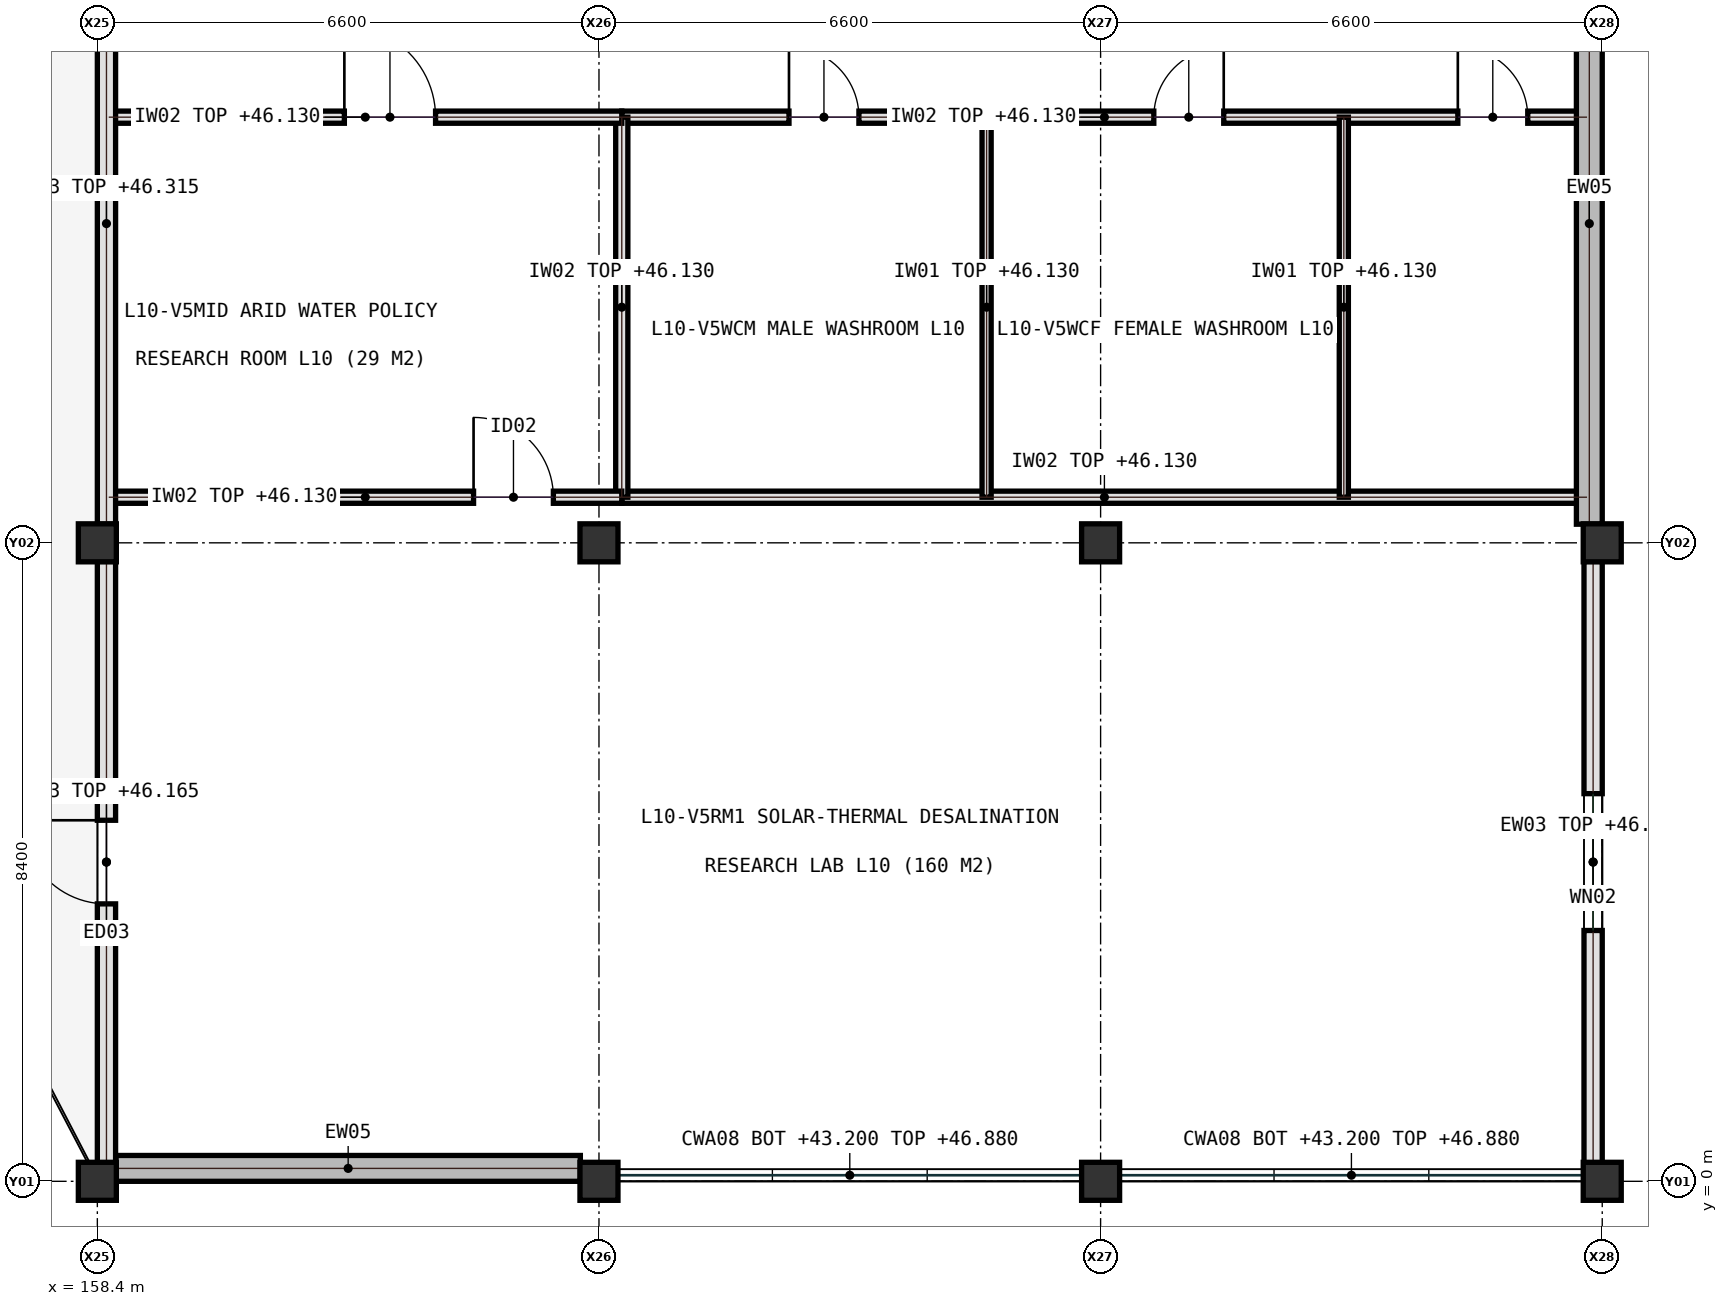
"""IFC4 building model, lengths in metres.
Left out: names, types, materials, properties, quantities, classifications, styles, units other than length and angle.
Written with IfcOpenShell. Run it as: python <this file> out.ifc"""

import sys

from ifc_helpers import new_model, si_unit, direction, frame, frame_2d, origin, origin_2d, place, context, subcontext, project, spatial, rectangle, extrude, element, fill, save


model = new_model("IFC4")
c1 = context("Model", 3, precision=1e-05, world=origin(), true_north=direction((0.0, 1.0)))
c2 = subcontext(c1, "Body", "Model", "MODEL_VIEW")
j1 = project(units=[si_unit("LENGTHUNIT", "METRE"), si_unit("PLANEANGLEUNIT", "RADIAN")], contexts=[c1])
p1 = place(None, origin())
s1 = spatial("IfcSite", under=j1, at=p1, CompositionType="ELEMENT")
p2 = place(p1, origin())
s2 = spatial("IfcBuilding", under=s1, at=p2, CompositionType="ELEMENT")
p3 = place(p2, frame((0.0, 0.0, 43.2)))
s3 = spatial("IfcBuildingStorey", under=s2, at=p3, CompositionType="ELEMENT", Elevation=43.2)
for number, where, z_axis, x_axis in (
    (1, (158.4, 0.0, 0.0), (0.0, 0.0, 1.0), (1.0, 0.0, 0.0)),
    (2, (158.4, 8.4, 0.0), (0.0, 0.0, 1.0), (1.0, 0.0, 0.0)),
    (3, (165.0, 0.0, 0.0), (0.0, 0.0, 1.0), (1.0, 0.0, 0.0)),
    (4, (165.0, 8.4, 0.0), (0.0, 0.0, 1.0), (1.0, 0.0, 0.0)),
    (5, (171.6, 0.0, 0.0), (0.0, 0.0, 1.0), (1.0, 0.0, 0.0)),
    (6, (171.6, 8.4, 0.0), (0.0, 0.0, 1.0), (1.0, 0.0, 0.0)),
    (7, (178.2, 0.0, 0.0), (0.0, 0.0, 1.0), (1.0, 0.0, 0.0)),
    (8, (178.2, 8.4, 0.0), (0.0, 0.0, 1.0), (1.0, 0.0, 0.0)),
):
    element("IfcColumn", number, at=place(p3, frame(where, z_axis=z_axis, x_axis=x_axis)), inside=s3, PredefinedType="COLUMN", context=c2, shape_type="SweptSolid", body=[
        extrude(rectangle(XDim=0.5, YDim=0.5, at=origin_2d()), origin(), (0.0, 0.0, 1.0), 3.9),
    ])
p4 = place(p3, frame((165.3, 14.0, 0.0), z_axis=(0.0, 0.0, 1.0), x_axis=(1.0, 0.0, 0.0)))
e9 = element("IfcWall", 9, at=p4, inside=s3, PredefinedType="PARTITIONING", context=c2, shape_type="SweptSolid", body=[
    extrude(rectangle(XDim=12.7, YDim=0.16, at=frame_2d((6.35, 0.0))), origin(), (0.0, 0.0, 1.0), 2.93),
])
p5 = place(p4, frame((2.2, 0.0, 0.0)))
e10 = element("IfcOpeningElement", 10, at=p5, cuts=e9, PredefinedType="OPENING", context=c2, shape_type="SweptSolid", body=[
    extrude(rectangle(XDim=0.92, YDim=2.08, at=frame_2d((0.46, 1.04))), frame((0.0, 0.09, 0.0), z_axis=(0.0, -1.0, 0.0), x_axis=(1.0, 0.0, 0.0)), (0.0, 0.0, 1.0), 0.18),
])
p6 = place(p4, frame((7.0, 0.0, 0.0)))
e11 = element("IfcOpeningElement", 11, at=p6, cuts=e9, PredefinedType="OPENING", context=c2, shape_type="SweptSolid", body=[
    extrude(rectangle(XDim=0.92, YDim=2.08, at=frame_2d((0.46, 1.04))), frame((0.0, 0.09, 0.0), z_axis=(0.0, -1.0, 0.0), x_axis=(1.0, 0.0, 0.0)), (0.0, 0.0, 1.0), 0.18),
])
p7 = place(p4, frame((11.0, 0.0, 0.0)))
e12 = element("IfcOpeningElement", 12, at=p7, cuts=e9, PredefinedType="OPENING", context=c2, shape_type="SweptSolid", body=[
    extrude(rectangle(XDim=0.92, YDim=2.08, at=frame_2d((0.46, 1.04))), frame((0.0, 0.09, 0.0), z_axis=(0.0, -1.0, 0.0), x_axis=(1.0, 0.0, 0.0)), (0.0, 0.0, 1.0), 0.18),
])
p8 = place(p3, frame((165.3, 9.0, 0.0), z_axis=(0.0, 0.0, 1.0), x_axis=(1.0, 0.0, 0.0)))
e13 = element("IfcWall", 13, at=p8, inside=s3, PredefinedType="PARTITIONING", context=c2, shape_type="SweptSolid", body=[
    extrude(rectangle(XDim=12.7, YDim=0.16, at=frame_2d((6.35, 0.0))), origin(), (0.0, 0.0, 1.0), 2.93),
])
p9 = place(p3, frame((165.3, 9.0, 0.0), z_axis=(0.0, 0.0, 1.0), x_axis=(0.0, 1.0, 0.0)))
e14 = element("IfcWall", 14, at=p9, inside=s3, PredefinedType="PARTITIONING", context=c2, shape_type="SweptSolid", body=[
    extrude(rectangle(XDim=5.0, YDim=0.16, at=frame_2d((2.5, 0.0))), origin(), (0.0, 0.0, 1.0), 2.93),
])
for number, where, z_axis, x_axis in (
    (15, (170.1, 9.0, 0.0), (0.0, 0.0, 1.0), (0.0, 1.0, 0.0)),
    (16, (174.8, 9.0, 0.0), (0.0, 0.0, 1.0), (0.0, 1.0, 0.0)),
):
    element("IfcWall", number, at=place(p3, frame(where, z_axis=z_axis, x_axis=x_axis)), inside=s3, PredefinedType="PARTITIONING", context=c2, shape_type="SweptSolid", body=[
        extrude(rectangle(XDim=5.0, YDim=0.12, at=frame_2d((2.5, 0.0))), origin(), (0.0, 0.0, 1.0), 2.93),
    ])
p10 = place(p3, frame((158.55, 9.0, 0.0), z_axis=(0.0, 0.0, 1.0), x_axis=(1.0, 0.0, 0.0)))
e17 = element("IfcWall", 17, at=p10, inside=s3, PredefinedType="PARTITIONING", context=c2, shape_type="SweptSolid", body=[
    extrude(rectangle(XDim=6.75, YDim=0.16, at=frame_2d((3.375, 0.0))), origin(), (0.0, 0.0, 1.0), 2.93),
])
p11 = place(p10, frame((4.8, 0.0, 0.0)))
e18 = element("IfcOpeningElement", 18, at=p11, cuts=e17, PredefinedType="OPENING", context=c2, shape_type="SweptSolid", body=[
    extrude(rectangle(XDim=1.05, YDim=2.15, at=frame_2d((0.525, 1.075))), frame((0.0, 0.09, 0.0), z_axis=(0.0, -1.0, 0.0), x_axis=(1.0, 0.0, 0.0)), (0.0, 0.0, 1.0), 0.18),
])
p12 = place(p3, frame((158.55, 14.0, 0.0), z_axis=(0.0, 0.0, 1.0), x_axis=(1.0, 0.0, 0.0)))
e19 = element("IfcWall", 19, at=p12, inside=s3, PredefinedType="PARTITIONING", context=c2, shape_type="SweptSolid", body=[
    extrude(rectangle(XDim=6.75, YDim=0.16, at=frame_2d((3.375, 0.0))), origin(), (0.0, 0.0, 1.0), 2.93),
])
p13 = place(p12, frame((3.1, 0.0, 0.0)))
e20 = element("IfcOpeningElement", 20, at=p13, cuts=e19, PredefinedType="OPENING", context=c2, shape_type="SweptSolid", body=[
    extrude(rectangle(XDim=1.2, YDim=2.22, at=frame_2d((0.6, 1.11))), frame((0.0, 0.09, 0.0), z_axis=(0.0, -1.0, 0.0), x_axis=(1.0, 0.0, 0.0)), (0.0, 0.0, 1.0), 0.18),
])
p14 = place(p3, frame((158.645, 0.17, 0.0), z_axis=(0.0, 0.0, 1.0), x_axis=(1.0, 0.0, 0.0)))
e21 = element("IfcWall", 21, at=p14, inside=s3, PredefinedType="SHEAR", context=c2, shape_type="SweptSolid", body=[
    extrude(rectangle(XDim=6.11, YDim=0.34, at=frame_2d((3.055, 0.0))), origin(), (0.0, 0.0, 1.0), 3.68),
])
p15 = place(p3, frame((158.52, 8.155, 0.0), z_axis=(0.0, 0.0, 1.0), x_axis=(0.0, -1.0, 0.0)))
e22 = element("IfcWall", 22, at=p15, inside=s3, PredefinedType="SOLIDWALL", context=c2, shape_type="SweptSolid", body=[
    extrude(rectangle(XDim=7.91, YDim=0.24, at=frame_2d((3.955, 0.0))), origin(), (0.0, 0.0, 1.0), 2.965),
])
p16 = place(p15, frame((3.405, 0.0, 0.0)))
e23 = element("IfcOpeningElement", 23, at=p16, cuts=e22, PredefinedType="OPENING", context=c2, shape_type="SweptSolid", body=[
    extrude(rectangle(XDim=1.1, YDim=2.2, at=frame_2d((0.55, 1.1))), frame((0.0, 0.13, 0.0), z_axis=(0.0, -1.0, 0.0), x_axis=(1.0, 0.0, 0.0)), (0.0, 0.0, 1.0), 0.26),
])
p17 = place(p3, frame((158.52, 16.555, 0.0), z_axis=(0.0, 0.0, 1.0), x_axis=(0.0, -1.0, 0.0)))
e24 = element("IfcWall", 24, at=p17, inside=s3, PredefinedType="SOLIDWALL", context=c2, shape_type="SweptSolid", body=[
    extrude(rectangle(XDim=7.91, YDim=0.24, at=frame_2d((3.955, 0.0))), origin(), (0.0, 0.0, 1.0), 3.115),
])
p18 = place(p3, frame((178.08, 0.245, 0.0), z_axis=(0.0, 0.0, 1.0), x_axis=(0.0, 1.0, 0.0)))
e25 = element("IfcWall", 25, at=p18, inside=s3, PredefinedType="SOLIDWALL", context=c2, shape_type="SweptSolid", body=[
    extrude(rectangle(XDim=7.91, YDim=0.24, at=frame_2d((3.955, 0.0))), origin(), (0.0, 0.0, 1.0), 2.965),
])
p19 = place(p18, frame((3.055, 0.0, 0.95)))
e26 = element("IfcOpeningElement", 26, at=p19, cuts=e25, PredefinedType="OPENING", context=c2, shape_type="SweptSolid", body=[
    extrude(rectangle(XDim=1.8, YDim=1.6, at=frame_2d((0.9, 0.8))), frame((0.0, 0.13, 0.0), z_axis=(0.0, -1.0, 0.0), x_axis=(1.0, 0.0, 0.0)), (0.0, 0.0, 1.0), 0.26),
])
p20 = place(p3, frame((178.03, 8.645, 0.0), z_axis=(0.0, 0.0, 1.0), x_axis=(0.0, 1.0, 0.0)))
e27 = element("IfcWall", 27, at=p20, inside=s3, PredefinedType="SHEAR", context=c2, shape_type="SweptSolid", body=[
    extrude(rectangle(XDim=7.91, YDim=0.34, at=frame_2d((3.955, 0.0))), origin(), (0.0, 0.0, 1.0), 3.68),
])
p21 = place(p5, origin())
e28 = element("IfcDoor", 28, at=p21, inside=s3, OperationType="SINGLE_SWING_LEFT", PredefinedType="DOOR", context=c2, shape_type="SweptSolid", body=[
    extrude(rectangle(XDim=0.92, YDim=2.08, at=frame_2d((0.46, 1.04))), frame((0.0, 0.025, 0.0), z_axis=(0.0, -1.0, 0.0), x_axis=(1.0, 0.0, 0.0)), (0.0, 0.0, 1.0), 0.05),
])
fill(e10, e28)
p22 = place(p6, origin())
e29 = element("IfcDoor", 29, at=p22, inside=s3, OperationType="SINGLE_SWING_RIGHT", PredefinedType="DOOR", context=c2, shape_type="SweptSolid", body=[
    extrude(rectangle(XDim=0.92, YDim=2.08, at=frame_2d((0.46, 1.04))), frame((0.0, 0.025, 0.0), z_axis=(0.0, -1.0, 0.0), x_axis=(1.0, 0.0, 0.0)), (0.0, 0.0, 1.0), 0.05),
])
fill(e11, e29)
p23 = place(p7, origin())
e30 = element("IfcDoor", 30, at=p23, inside=s3, OperationType="SINGLE_SWING_LEFT", PredefinedType="DOOR", context=c2, shape_type="SweptSolid", body=[
    extrude(rectangle(XDim=0.92, YDim=2.08, at=frame_2d((0.46, 1.04))), frame((0.0, 0.025, 0.0), z_axis=(0.0, -1.0, 0.0), x_axis=(1.0, 0.0, 0.0)), (0.0, 0.0, 1.0), 0.05),
])
fill(e12, e30)
p24 = place(p11, origin())
e31 = element("IfcDoor", 31, at=p24, inside=s3, OperationType="SINGLE_SWING_LEFT", PredefinedType="DOOR", context=c2, shape_type="SweptSolid", body=[
    extrude(rectangle(XDim=1.05, YDim=2.15, at=frame_2d((0.525, 1.075))), frame((0.0, 0.025, 0.0), z_axis=(0.0, -1.0, 0.0), x_axis=(1.0, 0.0, 0.0)), (0.0, 0.0, 1.0), 0.05),
])
fill(e18, e31)
p25 = place(p13, origin())
e32 = element("IfcDoor", 32, at=p25, inside=s3, OperationType="SINGLE_SWING_LEFT", PredefinedType="DOOR", context=c2, shape_type="SweptSolid", body=[
    extrude(rectangle(XDim=1.2, YDim=2.22, at=frame_2d((0.6, 1.11))), frame((0.0, 0.025, 0.0), z_axis=(0.0, -1.0, 0.0), x_axis=(1.0, 0.0, 0.0)), (0.0, 0.0, 1.0), 0.05),
])
fill(e20, e32)
p26 = place(p16, frame((1.1, 0.0, 0.0), z_axis=(0.0, 0.0, 1.0), x_axis=(-1.0, 0.0, 0.0)))
e33 = element("IfcDoor", 33, at=p26, inside=s3, OperationType="SINGLE_SWING_LEFT", PredefinedType="DOOR", context=c2, shape_type="SweptSolid", body=[
    extrude(rectangle(XDim=1.1, YDim=2.2, at=frame_2d((0.55, 1.1))), frame((0.0, 0.025, 0.0), z_axis=(0.0, -1.0, 0.0), x_axis=(1.0, 0.0, 0.0)), (0.0, 0.0, 1.0), 0.05),
])
fill(e23, e33)
p27 = place(p19, origin())
e34 = element("IfcWindow", 34, at=p27, inside=s3, PartitioningType="SINGLE_PANEL", PredefinedType="WINDOW", context=c2, shape_type="SweptSolid", body=[
    extrude(rectangle(XDim=1.8, YDim=1.6, at=frame_2d((0.9, 0.8))), frame((0.0, 0.03, 0.0), z_axis=(0.0, -1.0, 0.0), x_axis=(1.0, 0.0, 0.0)), (0.0, 0.0, 1.0), 0.06),
])
fill(e26, e34)
save(model, sys.argv[1])
